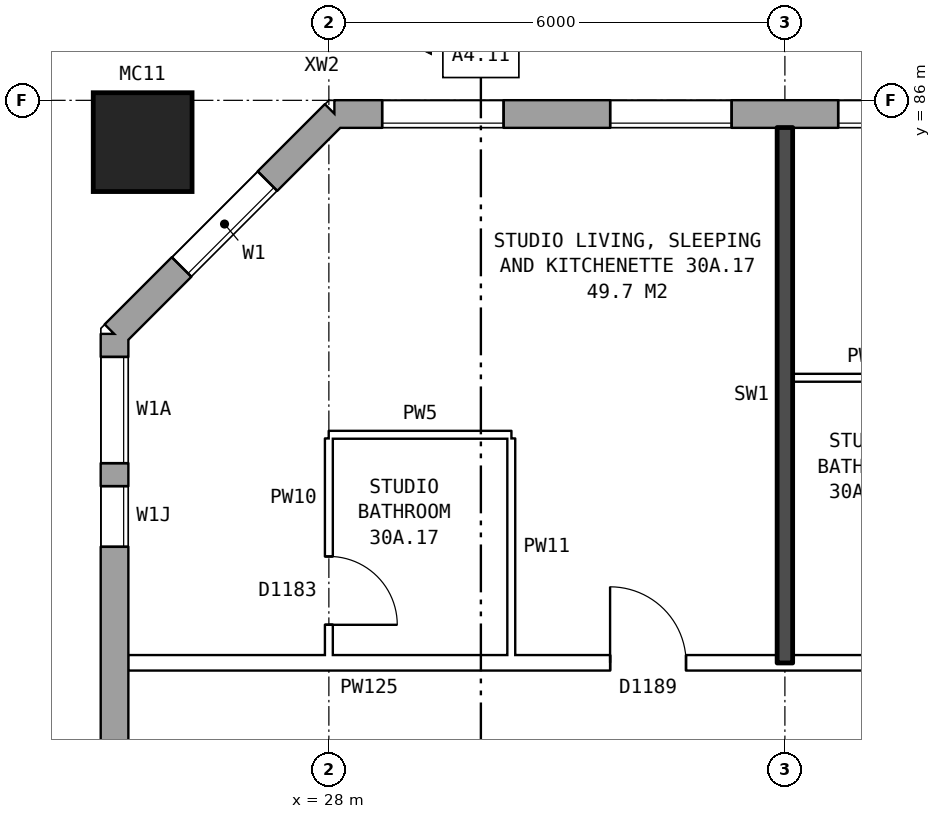
"""IFC4 building model, lengths in metres.
Left out: names, types, materials, properties, quantities, classifications, styles, units other than length and angle.
Written with IfcOpenShell. Run it as: python <this file> out.ifc"""

import sys

from ifc_helpers import new_model, si_unit, direction, frame, frame_2d, origin, origin_2d, place, context, subcontext, project, spatial, rectangle, hollow_rectangle, extrude, element, fill, save


model = new_model("IFC4")
c1 = context("Model", 3, precision=1e-05, world=origin(), true_north=direction((0.0, 1.0)))
c2 = subcontext(c1, "Body", "Model", "MODEL_VIEW")
j1 = project(units=[si_unit("LENGTHUNIT", "METRE"), si_unit("PLANEANGLEUNIT", "RADIAN")], contexts=[c1])
p1 = place(None, origin())
s1 = spatial("IfcSite", under=j1, at=p1, CompositionType="ELEMENT")
p2 = place(p1, origin())
s2 = spatial("IfcBuilding", under=s1, at=p2, CompositionType="ELEMENT")
p3 = place(p2, frame((0.0, 0.0, 108.8)))
s3 = spatial("IfcBuildingStorey", under=s2, at=p3, CompositionType="ELEMENT", Elevation=108.8)
p4 = place(p3, frame((25.55, 85.45, 0.0), z_axis=(0.0, 0.0, 1.0), x_axis=(1.0, 0.0, 0.0)))
e1 = element("IfcColumn", 1, at=p4, inside=s3, PredefinedType="COLUMN", context=c2, shape_type="SweptSolid", body=[
    extrude(hollow_rectangle(XDim=1.3, YDim=1.3, WallThickness=0.07, at=origin_2d()), origin(), (0.0, 0.0, 1.0), 3.1),
])
p5 = place(p3, frame((72.925, 85.82, 0.0), z_axis=(0.0, 0.0, 1.0), x_axis=(-1.0, 0.0, 0.0)))
e2 = element("IfcWall", 2, at=p5, inside=s3, PredefinedType="STANDARD", context=c2, shape_type="SweptSolid", body=[
    extrude(rectangle(XDim=44.851, YDim=0.36, at=frame_2d((22.425, 0.0))), origin(), (0.0, 0.0, 1.0), 2.85),
])
p6 = place(p5, frame((0.625, 0.0, 0.8)))
e3 = element("IfcOpeningElement", 3, at=p6, cuts=e2, PredefinedType="OPENING", context=c2, shape_type="SweptSolid", body=[
    extrude(rectangle(XDim=1.6, YDim=1.8, at=frame_2d((0.8, 0.9))), frame((0.0, 0.19, 0.0), z_axis=(0.0, -1.0, 0.0), x_axis=(1.0, 0.0, 0.0)), (0.0, 0.0, 1.0), 0.38),
])
p7 = place(p5, frame((3.625, 0.0, 0.8)))
e4 = element("IfcOpeningElement", 4, at=p7, cuts=e2, PredefinedType="OPENING", context=c2, shape_type="SweptSolid", body=[
    extrude(rectangle(XDim=1.6, YDim=1.8, at=frame_2d((0.8, 0.9))), frame((0.0, 0.19, 0.0), z_axis=(0.0, -1.0, 0.0), x_axis=(1.0, 0.0, 0.0)), (0.0, 0.0, 1.0), 0.38),
])
p8 = place(p5, frame((6.625, 0.0, 0.8)))
e5 = element("IfcOpeningElement", 5, at=p8, cuts=e2, PredefinedType="OPENING", context=c2, shape_type="SweptSolid", body=[
    extrude(rectangle(XDim=1.6, YDim=1.8, at=frame_2d((0.8, 0.9))), frame((0.0, 0.19, 0.0), z_axis=(0.0, -1.0, 0.0), x_axis=(1.0, 0.0, 0.0)), (0.0, 0.0, 1.0), 0.38),
])
p9 = place(p5, frame((9.625, 0.0, 0.8)))
e6 = element("IfcOpeningElement", 6, at=p9, cuts=e2, PredefinedType="OPENING", context=c2, shape_type="SweptSolid", body=[
    extrude(rectangle(XDim=1.6, YDim=1.8, at=frame_2d((0.8, 0.9))), frame((0.0, 0.19, 0.0), z_axis=(0.0, -1.0, 0.0), x_axis=(1.0, 0.0, 0.0)), (0.0, 0.0, 1.0), 0.38),
])
p10 = place(p5, frame((12.625, 0.0, 0.8)))
e7 = element("IfcOpeningElement", 7, at=p10, cuts=e2, PredefinedType="OPENING", context=c2, shape_type="SweptSolid", body=[
    extrude(rectangle(XDim=1.6, YDim=1.8, at=frame_2d((0.8, 0.9))), frame((0.0, 0.19, 0.0), z_axis=(0.0, -1.0, 0.0), x_axis=(1.0, 0.0, 0.0)), (0.0, 0.0, 1.0), 0.38),
])
p11 = place(p5, frame((15.125, 0.0, 1.65)))
e8 = element("IfcOpeningElement", 8, at=p11, cuts=e2, PredefinedType="OPENING", context=c2, shape_type="SweptSolid", body=[
    extrude(rectangle(XDim=1.0, YDim=0.9, at=frame_2d((0.5, 0.45))), frame((0.0, 0.19, 0.0), z_axis=(0.0, -1.0, 0.0), x_axis=(1.0, 0.0, 0.0)), (0.0, 0.0, 1.0), 0.38),
])
p12 = place(p5, frame((18.625, 0.0, 0.8)))
e9 = element("IfcOpeningElement", 9, at=p12, cuts=e2, PredefinedType="OPENING", context=c2, shape_type="SweptSolid", body=[
    extrude(rectangle(XDim=1.6, YDim=1.8, at=frame_2d((0.8, 0.9))), frame((0.0, 0.19, 0.0), z_axis=(0.0, -1.0, 0.0), x_axis=(1.0, 0.0, 0.0)), (0.0, 0.0, 1.0), 0.38),
])
p13 = place(p5, frame((21.625, 0.0, 0.8)))
e10 = element("IfcOpeningElement", 10, at=p13, cuts=e2, PredefinedType="OPENING", context=c2, shape_type="SweptSolid", body=[
    extrude(rectangle(XDim=1.6, YDim=1.8, at=frame_2d((0.8, 0.9))), frame((0.0, 0.19, 0.0), z_axis=(0.0, -1.0, 0.0), x_axis=(1.0, 0.0, 0.0)), (0.0, 0.0, 1.0), 0.38),
])
p14 = place(p5, frame((24.625, 0.0, 0.8)))
e11 = element("IfcOpeningElement", 11, at=p14, cuts=e2, PredefinedType="OPENING", context=c2, shape_type="SweptSolid", body=[
    extrude(rectangle(XDim=1.6, YDim=1.8, at=frame_2d((0.8, 0.9))), frame((0.0, 0.19, 0.0), z_axis=(0.0, -1.0, 0.0), x_axis=(1.0, 0.0, 0.0)), (0.0, 0.0, 1.0), 0.38),
])
p15 = place(p5, frame((29.075, 0.0, 1.4)))
e12 = element("IfcOpeningElement", 12, at=p15, cuts=e2, PredefinedType="OPENING", context=c2, shape_type="SweptSolid", body=[
    extrude(rectangle(XDim=1.2, YDim=1.2, at=frame_2d((0.6, 0.6))), frame((0.0, 0.19, 0.0), z_axis=(0.0, -1.0, 0.0), x_axis=(1.0, 0.0, 0.0)), (0.0, 0.0, 1.0), 0.38),
])
p16 = place(p5, frame((30.625, 0.0, 0.8)))
e13 = element("IfcOpeningElement", 13, at=p16, cuts=e2, PredefinedType="OPENING", context=c2, shape_type="SweptSolid", body=[
    extrude(rectangle(XDim=1.6, YDim=1.8, at=frame_2d((0.8, 0.9))), frame((0.0, 0.19, 0.0), z_axis=(0.0, -1.0, 0.0), x_axis=(1.0, 0.0, 0.0)), (0.0, 0.0, 1.0), 0.38),
])
p17 = place(p5, frame((33.625, 0.0, 0.8)))
e14 = element("IfcOpeningElement", 14, at=p17, cuts=e2, PredefinedType="OPENING", context=c2, shape_type="SweptSolid", body=[
    extrude(rectangle(XDim=1.6, YDim=1.8, at=frame_2d((0.8, 0.9))), frame((0.0, 0.19, 0.0), z_axis=(0.0, -1.0, 0.0), x_axis=(1.0, 0.0, 0.0)), (0.0, 0.0, 1.0), 0.38),
])
p18 = place(p5, frame((36.625, 0.0, 0.8)))
e15 = element("IfcOpeningElement", 15, at=p18, cuts=e2, PredefinedType="OPENING", context=c2, shape_type="SweptSolid", body=[
    extrude(rectangle(XDim=1.6, YDim=1.8, at=frame_2d((0.8, 0.9))), frame((0.0, 0.19, 0.0), z_axis=(0.0, -1.0, 0.0), x_axis=(1.0, 0.0, 0.0)), (0.0, 0.0, 1.0), 0.38),
])
p19 = place(p5, frame((39.625, 0.0, 0.8)))
e16 = element("IfcOpeningElement", 16, at=p19, cuts=e2, PredefinedType="OPENING", context=c2, shape_type="SweptSolid", body=[
    extrude(rectangle(XDim=1.6, YDim=1.8, at=frame_2d((0.8, 0.9))), frame((0.0, 0.19, 0.0), z_axis=(0.0, -1.0, 0.0), x_axis=(1.0, 0.0, 0.0)), (0.0, 0.0, 1.0), 0.38),
])
p20 = place(p5, frame((42.625, 0.0, 0.8)))
e17 = element("IfcOpeningElement", 17, at=p20, cuts=e2, PredefinedType="OPENING", context=c2, shape_type="SweptSolid", body=[
    extrude(rectangle(XDim=1.6, YDim=1.8, at=frame_2d((0.8, 0.9))), frame((0.0, 0.19, 0.0), z_axis=(0.0, -1.0, 0.0), x_axis=(1.0, 0.0, 0.0)), (0.0, 0.0, 1.0), 0.38),
])
p21 = place(p5, frame((16.525, 0.0, 0.15)))
e18 = element("IfcOpeningElement", 18, at=p21, cuts=e2, PredefinedType="OPENING", context=c2, shape_type="SweptSolid", body=[
    extrude(rectangle(XDim=1.2, YDim=0.9, at=frame_2d((0.6, 0.45))), frame((0.0, 0.19, 0.0), z_axis=(0.0, -1.0, 0.0), x_axis=(1.0, 0.0, 0.0)), (0.0, 0.0, 1.0), 0.38),
])
p22 = place(p3, frame((28.075, 85.82, 0.0), z_axis=(0.0, 0.0, 1.0), x_axis=(-0.707106781187, -0.707106781187, 0.0)))
e19 = element("IfcWall", 19, at=p22, inside=s3, PredefinedType="STANDARD", context=c2, shape_type="SweptSolid", body=[
    extrude(rectangle(XDim=4.094, YDim=0.36, at=frame_2d((2.047, 0.0))), origin(), (0.0, 0.0, 1.0), 2.85),
])
p23 = place(p22, frame((1.247, 0.0, 0.8)))
e20 = element("IfcOpeningElement", 20, at=p23, cuts=e19, PredefinedType="OPENING", context=c2, shape_type="SweptSolid", body=[
    extrude(rectangle(XDim=1.6, YDim=1.8, at=frame_2d((0.8, 0.9))), frame((0.0, 0.19, 0.0), z_axis=(0.0, -1.0, 0.0), x_axis=(1.0, 0.0, 0.0)), (0.0, 0.0, 1.0), 0.38),
])
p24 = place(p3, frame((25.18, 82.925, 0.0), z_axis=(0.0, 0.0, 1.0), x_axis=(0.0, -1.0, 0.0)))
e21 = element("IfcWall", 21, at=p24, inside=s3, PredefinedType="STANDARD", context=c2, shape_type="SweptSolid", body=[
    extrude(rectangle(XDim=25.851, YDim=0.36, at=frame_2d((12.925, 0.0))), origin(), (0.0, 0.0, 1.0), 2.85),
])
p25 = place(p24, frame((0.3, 0.0, 0.8)))
e22 = element("IfcOpeningElement", 22, at=p25, cuts=e21, PredefinedType="OPENING", context=c2, shape_type="SweptSolid", body=[
    extrude(rectangle(XDim=1.4, YDim=1.8, at=frame_2d((0.7, 0.9))), frame((0.0, 0.19, 0.0), z_axis=(0.0, -1.0, 0.0), x_axis=(1.0, 0.0, 0.0)), (0.0, 0.0, 1.0), 0.38),
])
p26 = place(p24, frame((5.525, 0.0, 1.4)))
e23 = element("IfcOpeningElement", 23, at=p26, cuts=e21, PredefinedType="OPENING", context=c2, shape_type="SweptSolid", body=[
    extrude(rectangle(XDim=1.4, YDim=1.2, at=frame_2d((0.7, 0.6))), frame((0.0, 0.19, 0.0), z_axis=(0.0, -1.0, 0.0), x_axis=(1.0, 0.0, 0.0)), (0.0, 0.0, 1.0), 0.38),
])
p27 = place(p24, frame((7.625, 0.0, 0.8)))
e24 = element("IfcOpeningElement", 24, at=p27, cuts=e21, PredefinedType="OPENING", context=c2, shape_type="SweptSolid", body=[
    extrude(rectangle(XDim=1.6, YDim=1.8, at=frame_2d((0.8, 0.9))), frame((0.0, 0.19, 0.0), z_axis=(0.0, -1.0, 0.0), x_axis=(1.0, 0.0, 0.0)), (0.0, 0.0, 1.0), 0.38),
])
p28 = place(p24, frame((10.625, 0.0, 0.8)))
e25 = element("IfcOpeningElement", 25, at=p28, cuts=e21, PredefinedType="OPENING", context=c2, shape_type="SweptSolid", body=[
    extrude(rectangle(XDim=1.6, YDim=1.8, at=frame_2d((0.8, 0.9))), frame((0.0, 0.19, 0.0), z_axis=(0.0, -1.0, 0.0), x_axis=(1.0, 0.0, 0.0)), (0.0, 0.0, 1.0), 0.38),
])
p29 = place(p24, frame((13.625, 0.0, 0.8)))
e26 = element("IfcOpeningElement", 26, at=p29, cuts=e21, PredefinedType="OPENING", context=c2, shape_type="SweptSolid", body=[
    extrude(rectangle(XDim=1.6, YDim=1.8, at=frame_2d((0.8, 0.9))), frame((0.0, 0.19, 0.0), z_axis=(0.0, -1.0, 0.0), x_axis=(1.0, 0.0, 0.0)), (0.0, 0.0, 1.0), 0.38),
])
p30 = place(p24, frame((16.625, 0.0, 0.8)))
e27 = element("IfcOpeningElement", 27, at=p30, cuts=e21, PredefinedType="OPENING", context=c2, shape_type="SweptSolid", body=[
    extrude(rectangle(XDim=1.6, YDim=1.8, at=frame_2d((0.8, 0.9))), frame((0.0, 0.19, 0.0), z_axis=(0.0, -1.0, 0.0), x_axis=(1.0, 0.0, 0.0)), (0.0, 0.0, 1.0), 0.38),
])
p31 = place(p24, frame((9.525, 0.0, 0.8)))
e28 = element("IfcOpeningElement", 28, at=p31, cuts=e21, PredefinedType="OPENING", context=c2, shape_type="SweptSolid", body=[
    extrude(rectangle(XDim=0.8, YDim=1.8, at=frame_2d((0.4, 0.9))), frame((0.0, 0.19, 0.0), z_axis=(0.0, -1.0, 0.0), x_axis=(1.0, 0.0, 0.0)), (0.0, 0.0, 1.0), 0.38),
])
p32 = place(p24, frame((22.475, 0.0, 0.8)))
e29 = element("IfcOpeningElement", 29, at=p32, cuts=e21, PredefinedType="OPENING", context=c2, shape_type="SweptSolid", body=[
    extrude(rectangle(XDim=1.0, YDim=1.2, at=frame_2d((0.5, 0.6))), frame((0.0, 0.19, 0.0), z_axis=(0.0, -1.0, 0.0), x_axis=(1.0, 0.0, 0.0)), (0.0, 0.0, 1.0), 0.38),
])
p33 = place(p24, frame((2.0, 0.0, 0.8)))
e30 = element("IfcOpeningElement", 30, at=p33, cuts=e21, PredefinedType="OPENING", context=c2, shape_type="SweptSolid", body=[
    extrude(rectangle(XDim=0.8, YDim=1.5, at=frame_2d((0.4, 0.75))), frame((0.0, 0.19, 0.0), z_axis=(0.0, -1.0, 0.0), x_axis=(1.0, 0.0, 0.0)), (0.0, 0.0, 1.0), 0.38),
])
p34 = place(p24, frame((12.525, 0.0, 0.8)))
e31 = element("IfcOpeningElement", 31, at=p34, cuts=e21, PredefinedType="OPENING", context=c2, shape_type="SweptSolid", body=[
    extrude(rectangle(XDim=0.8, YDim=1.8, at=frame_2d((0.4, 0.9))), frame((0.0, 0.19, 0.0), z_axis=(0.0, -1.0, 0.0), x_axis=(1.0, 0.0, 0.0)), (0.0, 0.0, 1.0), 0.38),
])
p35 = place(p24, frame((15.525, 0.0, 0.8)))
e32 = element("IfcOpeningElement", 32, at=p35, cuts=e21, PredefinedType="OPENING", context=c2, shape_type="SweptSolid", body=[
    extrude(rectangle(XDim=0.8, YDim=1.8, at=frame_2d((0.4, 0.9))), frame((0.0, 0.19, 0.0), z_axis=(0.0, -1.0, 0.0), x_axis=(1.0, 0.0, 0.0)), (0.0, 0.0, 1.0), 0.38),
])
p36 = place(p24, frame((18.525, 0.0, 0.8)))
e33 = element("IfcOpeningElement", 33, at=p36, cuts=e21, PredefinedType="OPENING", context=c2, shape_type="SweptSolid", body=[
    extrude(rectangle(XDim=0.8, YDim=1.8, at=frame_2d((0.4, 0.9))), frame((0.0, 0.19, 0.0), z_axis=(0.0, -1.0, 0.0), x_axis=(1.0, 0.0, 0.0)), (0.0, 0.0, 1.0), 0.38),
])
p37 = place(p24, frame((23.775, 0.0, 0.8)))
e34 = element("IfcOpeningElement", 34, at=p37, cuts=e21, PredefinedType="OPENING", context=c2, shape_type="SweptSolid", body=[
    extrude(rectangle(XDim=1.4, YDim=1.8, at=frame_2d((0.7, 0.9))), frame((0.0, 0.19, 0.0), z_axis=(0.0, -1.0, 0.0), x_axis=(1.0, 0.0, 0.0)), (0.0, 0.0, 1.0), 0.38),
])
p38 = place(p3, frame((25.36, 78.6, 0.0), z_axis=(0.0, 0.0, 1.0), x_axis=(1.0, 0.0, 0.0)))
e35 = element("IfcWall", 35, at=p38, inside=s3, PredefinedType="PARTITIONING", context=c2, shape_type="SweptSolid", body=[
    extrude(rectangle(XDim=20.54, YDim=0.2, at=frame_2d((10.27, 0.0))), origin(), (0.0, 0.0, 1.0), 2.85),
])
p39 = place(p38, frame((18.09, 0.0, 0.0)))
e36 = element("IfcOpeningElement", 36, at=p39, cuts=e35, PredefinedType="OPENING", context=c2, shape_type="SweptSolid", body=[
    extrude(rectangle(XDim=1.0, YDim=2.1, at=frame_2d((0.5, 1.05))), frame((0.0, 0.11, 0.0), z_axis=(0.0, -1.0, 0.0), x_axis=(1.0, 0.0, 0.0)), (0.0, 0.0, 1.0), 0.22),
])
p40 = place(p38, frame((12.14, 0.0, 0.0)))
e37 = element("IfcOpeningElement", 37, at=p40, cuts=e35, PredefinedType="OPENING", context=c2, shape_type="SweptSolid", body=[
    extrude(rectangle(XDim=1.0, YDim=2.1, at=frame_2d((0.5, 1.05))), frame((0.0, 0.11, 0.0), z_axis=(0.0, -1.0, 0.0), x_axis=(1.0, 0.0, 0.0)), (0.0, 0.0, 1.0), 0.22),
])
p41 = place(p38, frame((6.34, 0.0, 0.0)))
e38 = element("IfcOpeningElement", 38, at=p41, cuts=e35, PredefinedType="OPENING", context=c2, shape_type="SweptSolid", body=[
    extrude(rectangle(XDim=1.0, YDim=2.1, at=frame_2d((0.5, 1.05))), frame((0.0, 0.11, 0.0), z_axis=(0.0, -1.0, 0.0), x_axis=(1.0, 0.0, 0.0)), (0.0, 0.0, 1.0), 0.22),
])
p42 = place(p3, frame((28.0, 81.6, 0.0), z_axis=(0.0, 0.0, 1.0), x_axis=(1.0, 0.0, 0.0)))
e39 = element("IfcWall", 39, at=p42, inside=s3, PredefinedType="PARTITIONING", context=c2, shape_type="SweptSolid", body=[
    extrude(rectangle(XDim=2.4, YDim=0.1, at=frame_2d((1.2, 0.0))), origin(), (0.0, 0.0, 1.0), 2.85),
])
p43 = place(p3, frame((34.1, 82.35, 0.0), z_axis=(0.0, 0.0, 1.0), x_axis=(1.0, 0.0, 0.0)))
e40 = element("IfcWall", 40, at=p43, inside=s3, PredefinedType="PARTITIONING", context=c2, shape_type="SweptSolid", body=[
    extrude(rectangle(XDim=1.9, YDim=0.1, at=frame_2d((0.95, 0.0))), origin(), (0.0, 0.0, 1.0), 2.85),
])
p44 = place(p3, frame((28.0, 78.7, 0.0), z_axis=(0.0, 0.0, 1.0), x_axis=(0.0, 1.0, 0.0)))
e41 = element("IfcWall", 41, at=p44, inside=s3, PredefinedType="PARTITIONING", context=c2, shape_type="SweptSolid", body=[
    extrude(rectangle(XDim=2.85, YDim=0.1, at=frame_2d((1.425, 0.0))), origin(), (0.0, 0.0, 1.0), 2.85),
])
p45 = place(p44, frame((0.4, 0.0, 0.0)))
e42 = element("IfcOpeningElement", 42, at=p45, cuts=e41, PredefinedType="OPENING", context=c2, shape_type="SweptSolid", body=[
    extrude(rectangle(XDim=0.9, YDim=2.1, at=frame_2d((0.45, 1.05))), frame((0.0, 0.06, 0.0), z_axis=(0.0, -1.0, 0.0), x_axis=(1.0, 0.0, 0.0)), (0.0, 0.0, 1.0), 0.12),
])
p46 = place(p3, frame((30.4, 78.7, 0.0), z_axis=(0.0, 0.0, 1.0), x_axis=(0.0, 1.0, 0.0)))
e43 = element("IfcWall", 43, at=p46, inside=s3, PredefinedType="PARTITIONING", context=c2, shape_type="SweptSolid", body=[
    extrude(rectangle(XDim=2.85, YDim=0.1, at=frame_2d((1.425, 0.0))), origin(), (0.0, 0.0, 1.0), 2.85),
])
p47 = place(p3, frame((34.0, 78.6, 0.0), z_axis=(0.0, 0.0, 1.0), x_axis=(0.0, 1.0, 0.0)))
e44 = element("IfcWall", 44, at=p47, inside=s3, PredefinedType="SOLIDWALL", context=c2, shape_type="SweptSolid", body=[
    extrude(rectangle(XDim=7.04, YDim=0.2, at=frame_2d((3.52, 0.0))), origin(), (0.0, 0.0, 1.0), 2.85),
])
p48 = place(p18, origin())
e45 = element("IfcWindow", 45, at=p48, inside=s3, PartitioningType="SINGLE_PANEL", PredefinedType="WINDOW", context=c2, shape_type="SweptSolid", body=[
    extrude(rectangle(XDim=1.6, YDim=1.8, at=frame_2d((0.8, 0.9))), frame((0.0, 0.15, 0.0), z_axis=(0.0, -1.0, 0.0), x_axis=(1.0, 0.0, 0.0)), (0.0, 0.0, 1.0), 0.06),
])
fill(e15, e45)
p49 = place(p19, origin())
e46 = element("IfcWindow", 46, at=p49, inside=s3, PartitioningType="SINGLE_PANEL", PredefinedType="WINDOW", context=c2, shape_type="SweptSolid", body=[
    extrude(rectangle(XDim=1.6, YDim=1.8, at=frame_2d((0.8, 0.9))), frame((0.0, 0.15, 0.0), z_axis=(0.0, -1.0, 0.0), x_axis=(1.0, 0.0, 0.0)), (0.0, 0.0, 1.0), 0.06),
])
fill(e16, e46)
p50 = place(p20, origin())
e47 = element("IfcWindow", 47, at=p50, inside=s3, PartitioningType="SINGLE_PANEL", PredefinedType="WINDOW", context=c2, shape_type="SweptSolid", body=[
    extrude(rectangle(XDim=1.6, YDim=1.8, at=frame_2d((0.8, 0.9))), frame((0.0, 0.15, 0.0), z_axis=(0.0, -1.0, 0.0), x_axis=(1.0, 0.0, 0.0)), (0.0, 0.0, 1.0), 0.06),
])
fill(e17, e47)
p51 = place(p23, origin())
e48 = element("IfcWindow", 48, at=p51, inside=s3, PartitioningType="SINGLE_PANEL", PredefinedType="WINDOW", context=c2, shape_type="SweptSolid", body=[
    extrude(rectangle(XDim=1.6, YDim=1.8, at=frame_2d((0.8, 0.9))), frame((0.0, 0.15, 0.0), z_axis=(0.0, -1.0, 0.0), x_axis=(1.0, 0.0, 0.0)), (0.0, 0.0, 1.0), 0.06),
])
fill(e20, e48)
p52 = place(p25, origin())
e49 = element("IfcWindow", 49, at=p52, inside=s3, PartitioningType="SINGLE_PANEL", PredefinedType="WINDOW", context=c2, shape_type="SweptSolid", body=[
    extrude(rectangle(XDim=1.4, YDim=1.8, at=frame_2d((0.7, 0.9))), frame((0.0, 0.15, 0.0), z_axis=(0.0, -1.0, 0.0), x_axis=(1.0, 0.0, 0.0)), (0.0, 0.0, 1.0), 0.06),
])
fill(e22, e49)
p53 = place(p41, origin())
e50 = element("IfcDoor", 50, at=p53, inside=s3, OperationType="SINGLE_SWING_LEFT", PredefinedType="DOOR", context=c2, shape_type="SweptSolid", body=[
    extrude(rectangle(XDim=1.0, YDim=2.1, at=frame_2d((0.5, 1.05))), frame((0.0, 0.025, 0.0), z_axis=(0.0, -1.0, 0.0), x_axis=(1.0, 0.0, 0.0)), (0.0, 0.0, 1.0), 0.05),
])
fill(e38, e50)
p54 = place(p45, frame((0.9, 0.0, 0.0), z_axis=(0.0, 0.0, 1.0), x_axis=(-1.0, 0.0, 0.0)))
e51 = element("IfcDoor", 51, at=p54, inside=s3, OperationType="SINGLE_SWING_RIGHT", PredefinedType="DOOR", context=c2, shape_type="SweptSolid", body=[
    extrude(rectangle(XDim=0.9, YDim=2.1, at=frame_2d((0.45, 1.05))), frame((0.0, 0.025, 0.0), z_axis=(0.0, -1.0, 0.0), x_axis=(1.0, 0.0, 0.0)), (0.0, 0.0, 1.0), 0.05),
])
fill(e42, e51)
p55 = place(p33, origin())
e52 = element("IfcWindow", 52, at=p55, inside=s3, PartitioningType="SINGLE_PANEL", PredefinedType="WINDOW", context=c2, shape_type="SweptSolid", body=[
    extrude(rectangle(XDim=0.8, YDim=1.5, at=frame_2d((0.4, 0.75))), frame((0.0, 0.15, 0.0), z_axis=(0.0, -1.0, 0.0), x_axis=(1.0, 0.0, 0.0)), (0.0, 0.0, 1.0), 0.06),
])
fill(e30, e52)
save(model, sys.argv[1])
